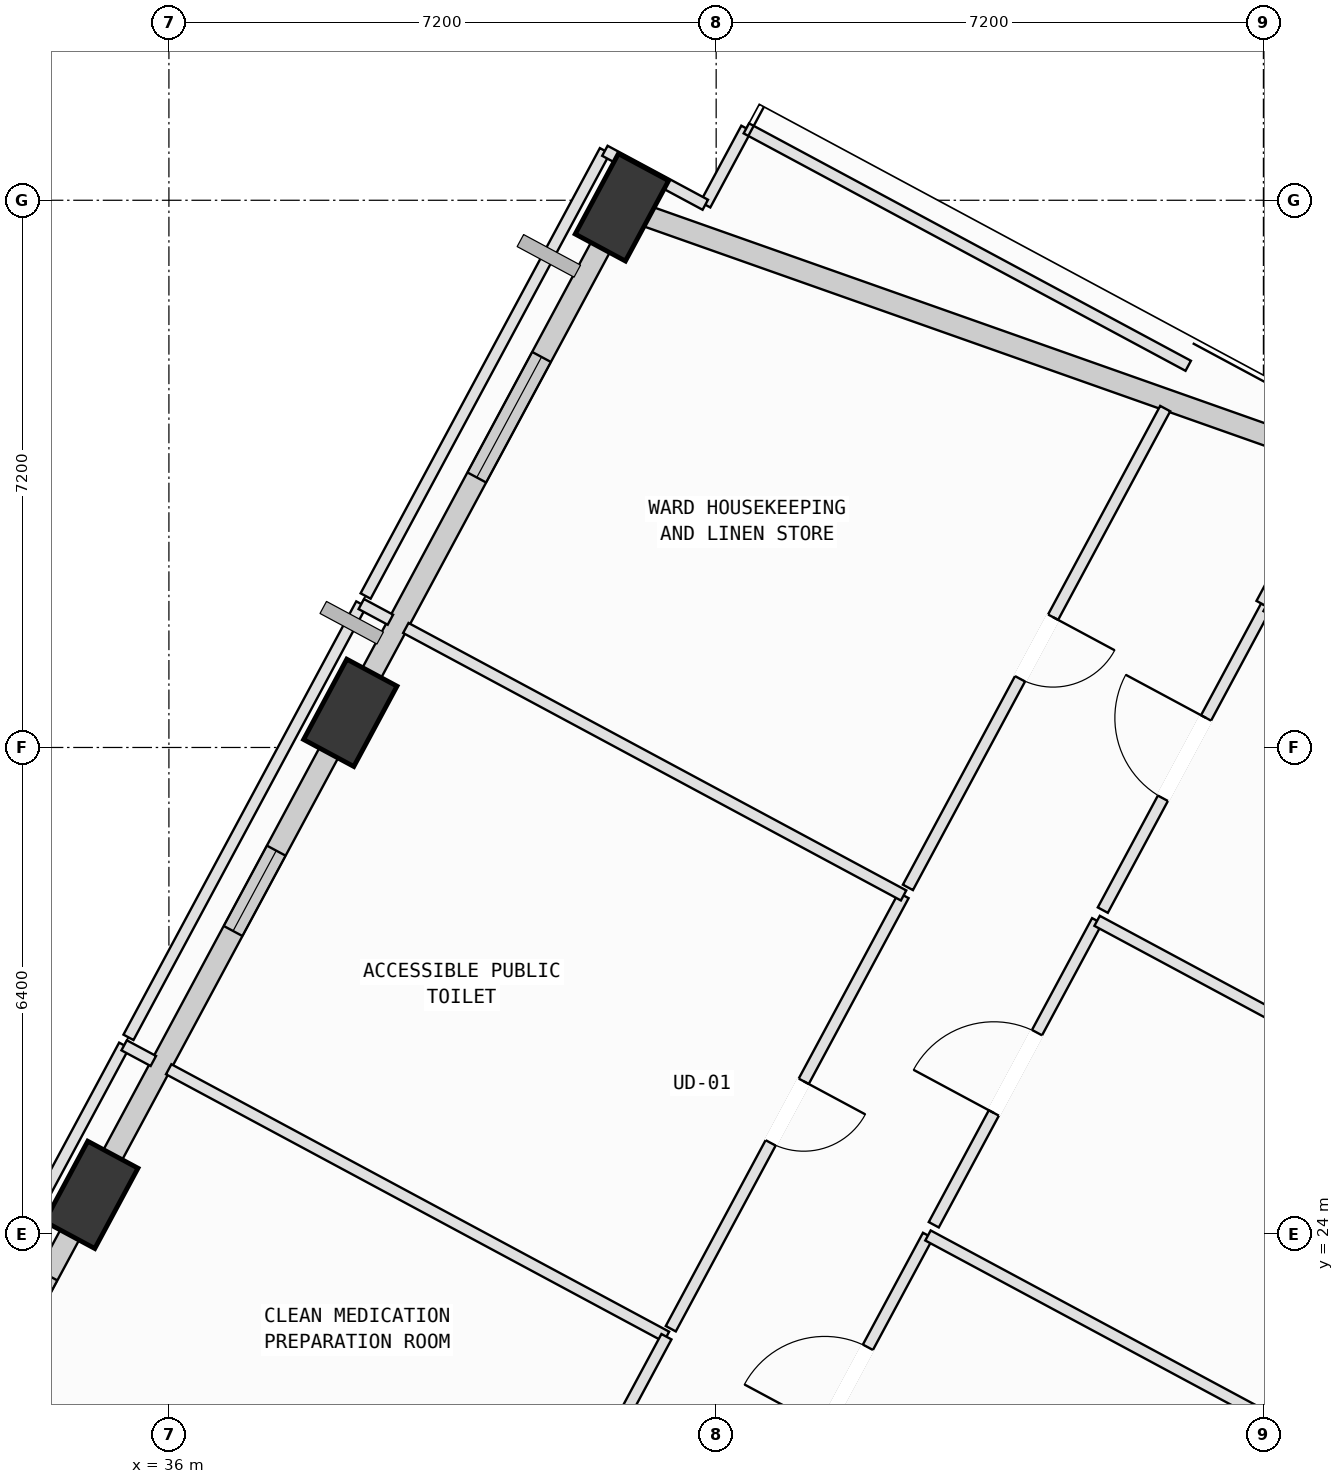
"""IFC4 building model, lengths in metres.
Left out: names, types, materials, properties, quantities, classifications, styles, units other than length and angle.
Written with IfcOpenShell. Run it as: python <this file> out.ifc"""

import sys

from ifc_helpers import new_model, si_unit, direction, frame, frame_2d, origin, origin_2d, place, context, subcontext, project, spatial, rectangle, extrude, element, fill, save


model = new_model("IFC4")
c1 = context("Model", 3, precision=1e-05, world=origin(), true_north=direction((0.0, 1.0)))
c2 = subcontext(c1, "Body", "Model", "MODEL_VIEW")
j1 = project(units=[si_unit("LENGTHUNIT", "METRE"), si_unit("PLANEANGLEUNIT", "RADIAN")], contexts=[c1])
p1 = place(None, origin())
s1 = spatial("IfcSite", under=j1, at=p1, CompositionType="ELEMENT")
p2 = place(p1, origin())
s2 = spatial("IfcBuilding", under=s1, at=p2, CompositionType="ELEMENT")
p3 = place(p2, frame((0.0, 0.0, 288.6)))
s3 = spatial("IfcBuildingStorey", under=s2, at=p3, CompositionType="ELEMENT", Elevation=288.6)
p4 = place(p3, frame((41.96, 37.507, 0.002), z_axis=(-0.052860994468, 0.034143202886, 0.998018014347), x_axis=(0.481683827276, -0.874590087934, 0.055433461268)))
e1 = element("IfcColumn", 1, at=p4, inside=s3, PredefinedType="COLUMN", context=c2, shape_type="SweptSolid", body=[
    extrude(rectangle(XDim=1.2, YDim=0.75, at=origin_2d()), origin(), (0.0, 0.0, 1.0), 4.004),
])
p5 = place(p3, frame((38.386, 30.856, 0.002), z_axis=(-0.02527873729, 0.019661240115, 0.999487078995), x_axis=(0.404386239678, -0.914153133905, 0.028210227402)))
e2 = element("IfcColumn", 2, at=p5, inside=s3, PredefinedType="COLUMN", context=c2, shape_type="SweptSolid", body=[
    extrude(rectangle(XDim=1.2, YDim=0.75, at=origin_2d()), origin(), (0.0, 0.0, 1.0), 3.998),
])
p6 = place(p3, frame((34.979, 24.513, 0.002), z_axis=(0.001160710729, 0.005742463608, 0.999982838284), x_axis=(-0.638457278881, -0.769639960871, 0.005160782248)))
e3 = element("IfcColumn", 3, at=p6, inside=s3, PredefinedType="COLUMN", context=c2, shape_type="SweptSolid", body=[
    extrude(rectangle(XDim=1.2, YDim=0.75, at=origin_2d()), origin(), (0.0, 0.0, 1.0), 3.996),
])
p7 = place(p3, frame((42.218, 37.415, 0.0), z_axis=(0.0, 0.0, 1.0), x_axis=(0.942871061755, -0.33315786184, 0.0)))
e4 = element("IfcWall", 4, at=p7, inside=s3, PredefinedType="SOLIDWALL", context=c2, shape_type="SweptSolid", body=[
    extrude(rectangle(XDim=9.036, YDim=0.28, at=frame_2d((4.518, 0.0))), origin(), (0.0, 0.0, 1.0), 3.265),
])
p8 = place(p3, frame((38.577, 31.211, 0.0), z_axis=(0.0, 0.0, 1.0), x_axis=(0.473322273544, 0.880889337753, 0.0)))
e5 = element("IfcWall", 5, at=p8, inside=s3, PredefinedType="SOLIDWALL", context=c2, shape_type="SweptSolid", body=[
    extrude(rectangle(XDim=6.78, YDim=0.28, at=frame_2d((3.39, 0.0))), origin(), (0.0, 0.0, 1.0), 3.265),
])
p9 = place(p8, frame((3.113, 0.0, 0.75)))
e6 = element("IfcOpeningElement", 6, at=p9, cuts=e5, PredefinedType="OPENING", context=c2, shape_type="SweptSolid", body=[
    extrude(rectangle(XDim=1.8, YDim=2.05, at=frame_2d((0.9, 1.025))), frame((0.0, 0.15, 0.0), z_axis=(0.0, -1.0, 0.0), x_axis=(1.0, 0.0, 0.0)), (0.0, 0.0, 1.0), 0.3),
])
p10 = place(p3, frame((35.172, 24.873, 0.0), z_axis=(0.0, 0.0, 1.0), x_axis=(0.473318247503, 0.880891501026, 0.0)))
e7 = element("IfcWall", 7, at=p10, inside=s3, PredefinedType="SOLIDWALL", context=c2, shape_type="SweptSolid", body=[
    extrude(rectangle(XDim=6.409, YDim=0.28, at=frame_2d((3.205, 0.0))), origin(), (0.0, 0.0, 1.0), 3.265),
])
p11 = place(p10, frame((3.533, 0.0, 0.75)))
e8 = element("IfcOpeningElement", 8, at=p11, cuts=e7, PredefinedType="OPENING", context=c2, shape_type="SweptSolid", body=[
    extrude(rectangle(XDim=1.2, YDim=1.75, at=frame_2d((0.6, 0.875))), frame((0.0, 0.15, 0.0), z_axis=(0.0, -1.0, 0.0), x_axis=(1.0, 0.0, 0.0)), (0.0, 0.0, 1.0), 0.3),
])
p12 = place(p3, frame((31.881, 18.748, 0.0), z_axis=(0.0, 0.0, 1.0), x_axis=(0.473312386533, 0.880894650202, 0.0)))
e9 = element("IfcWall", 9, at=p12, inside=s3, PredefinedType="SOLIDWALL", context=c2, shape_type="SweptSolid", body=[
    extrude(rectangle(XDim=6.158, YDim=0.28, at=frame_2d((3.079, 0.0))), origin(), (0.0, 0.0, 1.0), 3.265),
])
p13 = place(p12, frame((3.742, 0.0, 0.75)))
e10 = element("IfcOpeningElement", 10, at=p13, cuts=e9, PredefinedType="OPENING", context=c2, shape_type="SweptSolid", body=[
    extrude(rectangle(XDim=1.6, YDim=1.95, at=frame_2d((0.8, 0.975))), frame((0.0, 0.15, 0.0), z_axis=(0.0, -1.0, 0.0), x_axis=(1.0, 0.0, 0.0)), (0.0, 0.0, 1.0), 0.3),
])
p14 = place(p3, frame((43.838, 19.98, 0.0), z_axis=(0.0, 0.0, 1.0), x_axis=(0.473390959729, 0.880852427622, 0.0)))
e11 = element("IfcWall", 11, at=p14, inside=s3, PredefinedType="PARTITIONING", context=c2, shape_type="SweptSolid", body=[
    extrude(rectangle(XDim=4.54, YDim=0.15, at=frame_2d((2.27, 0.0))), origin(), (0.0, 0.0, 1.0), 3.78),
])
p15 = place(p14, frame((1.67, 0.0, 0.0)))
e12 = element("IfcOpeningElement", 12, at=p15, cuts=e11, PredefinedType="OPENING", context=c2, shape_type="SweptSolid", body=[
    extrude(rectangle(XDim=1.2, YDim=2.15, at=frame_2d((0.6, 1.075))), frame((0.0, 0.085, 0.0), z_axis=(0.0, -1.0, 0.0), x_axis=(1.0, 0.0, 0.0)), (0.0, 0.0, 1.0), 0.17),
])
p16 = place(p3, frame((45.987, 23.979, 0.0), z_axis=(0.0, 0.0, 1.0), x_axis=(0.880899093264, -0.473304117336, 0.0)))
e13 = element("IfcWall", 13, at=p16, inside=s3, PredefinedType="PARTITIONING", context=c2, shape_type="SweptSolid", body=[
    extrude(rectangle(XDim=10.834, YDim=0.15, at=frame_2d((5.417, 0.0))), origin(), (0.0, 0.0, 1.0), 3.78),
])
p17 = place(p3, frame((46.063, 24.12, 0.0), z_axis=(0.0, 0.0, 1.0), x_axis=(0.473371657247, 0.88086280096, 0.0)))
e14 = element("IfcWall", 14, at=p17, inside=s3, PredefinedType="PARTITIONING", context=c2, shape_type="SweptSolid", body=[
    extrude(rectangle(XDim=4.54, YDim=0.15, at=frame_2d((2.27, 0.0))), origin(), (0.0, 0.0, 1.0), 3.78),
])
p18 = place(p17, frame((1.67, 0.0, 0.0)))
e15 = element("IfcOpeningElement", 15, at=p18, cuts=e14, PredefinedType="OPENING", context=c2, shape_type="SweptSolid", body=[
    extrude(rectangle(XDim=1.2, YDim=2.15, at=frame_2d((0.6, 1.075))), frame((0.0, 0.085, 0.0), z_axis=(0.0, -1.0, 0.0), x_axis=(1.0, 0.0, 0.0)), (0.0, 0.0, 1.0), 0.17),
])
p19 = place(p3, frame((48.212, 28.119, 0.0), z_axis=(0.0, 0.0, 1.0), x_axis=(0.880904141107, -0.473294722324, 0.0)))
e16 = element("IfcWall", 16, at=p19, inside=s3, PredefinedType="PARTITIONING", context=c2, shape_type="SweptSolid", body=[
    extrude(rectangle(XDim=10.834, YDim=0.15, at=frame_2d((5.417, 0.0))), origin(), (0.0, 0.0, 1.0), 3.78),
])
p20 = place(p3, frame((48.287, 28.26, 0.0), z_axis=(0.0, 0.0, 1.0), x_axis=(0.473259555236, 0.880923034877, 0.0)))
e17 = element("IfcWall", 17, at=p20, inside=s3, PredefinedType="PARTITIONING", context=c2, shape_type="SweptSolid", body=[
    extrude(rectangle(XDim=4.541, YDim=0.15, at=frame_2d((2.271, 0.0))), origin(), (0.0, 0.0, 1.0), 3.78),
])
p21 = place(p20, frame((1.67, 0.0, 0.0)))
e18 = element("IfcOpeningElement", 18, at=p21, cuts=e17, PredefinedType="OPENING", context=c2, shape_type="SweptSolid", body=[
    extrude(rectangle(XDim=1.2, YDim=2.15, at=frame_2d((0.6, 1.075))), frame((0.0, 0.085, 0.0), z_axis=(0.0, -1.0, 0.0), x_axis=(1.0, 0.0, 0.0)), (0.0, 0.0, 1.0), 0.17),
])
p22 = place(p3, frame((50.436, 32.26, 0.0), z_axis=(0.0, 0.0, 1.0), x_axis=(0.880864883218, -0.473367782505, 0.0)))
e19 = element("IfcWall", 19, at=p22, inside=s3, PredefinedType="PARTITIONING", context=c2, shape_type="SweptSolid", body=[
    extrude(rectangle(XDim=8.832, YDim=0.15, at=frame_2d((4.416, 0.0))), origin(), (0.0, 0.0, 1.0), 3.78),
])
p23 = place(p22, frame((3.986, 0.0, 0.0)))
e20 = element("IfcOpeningElement", 20, at=p23, cuts=e19, PredefinedType="OPENING", context=c2, shape_type="SweptSolid", body=[
    extrude(rectangle(XDim=0.86, YDim=2.06, at=frame_2d((0.43, 1.03))), frame((0.0, 0.085, 0.0), z_axis=(0.0, -1.0, 0.0), x_axis=(1.0, 0.0, 0.0)), (0.0, 0.0, 1.0), 0.17),
])
p24 = place(p3, frame((32.504, 21.07, 0.0), z_axis=(0.0, 0.0, 1.0), x_axis=(0.473270026335, 0.880917409394, 0.0)))
e21 = element("IfcWall", 21, at=p24, inside=s3, PredefinedType="PARTITIONING", context=c2, shape_type="SweptSolid", body=[
    extrude(rectangle(XDim=6.142, YDim=0.15, at=frame_2d((3.071, 0.0))), origin(), (0.0, 0.0, 1.0), 3.78),
])
p25 = place(p3, frame((35.411, 26.481, 0.0), z_axis=(0.0, 0.0, 1.0), x_axis=(0.881171652639, -0.472796487493, 0.0)))
e22 = element("IfcWall", 22, at=p25, inside=s3, PredefinedType="PARTITIONING", context=c2, shape_type="SweptSolid", body=[
    extrude(rectangle(XDim=0.436, YDim=0.15, at=frame_2d((0.218, 0.0))), origin(), (0.0, 0.0, 1.0), 3.78),
])
p26 = place(p3, frame((35.997, 26.166, 0.0), z_axis=(0.0, 0.0, 1.0), x_axis=(0.88087780034, -0.473343744934, 0.0)))
e23 = element("IfcWall", 23, at=p26, inside=s3, PredefinedType="PARTITIONING", context=c2, shape_type="SweptSolid", body=[
    extrude(rectangle(XDim=7.434, YDim=0.15, at=frame_2d((3.717, 0.0))), origin(), (0.0, 0.0, 1.0), 3.78),
])
p27 = place(p3, frame((42.546, 22.647, 0.0), z_axis=(0.0, 0.0, 1.0), x_axis=(-0.473270026335, -0.880917409394, 0.0)))
e24 = element("IfcWall", 24, at=p27, inside=s3, PredefinedType="PARTITIONING", context=c2, shape_type="SweptSolid", body=[
    extrude(rectangle(XDim=6.142, YDim=0.15, at=frame_2d((3.071, 0.0))), origin(), (0.0, 0.0, 1.0), 3.78),
])
p28 = place(p3, frame((45.666, 28.453, 0.0), z_axis=(0.0, 0.0, 1.0), x_axis=(-0.473292007071, -0.880905599961, 0.0)))
e25 = element("IfcWall", 25, at=p28, inside=s3, PredefinedType="PARTITIONING", context=c2, shape_type="SweptSolid", body=[
    extrude(rectangle(XDim=6.472, YDim=0.15, at=frame_2d((3.236, 0.0))), origin(), (0.0, 0.0, 1.0), 3.78),
])
p29 = place(p28, frame((2.776, 0.0, 0.0)))
e26 = element("IfcOpeningElement", 26, at=p29, cuts=e25, PredefinedType="OPENING", context=c2, shape_type="SweptSolid", body=[
    extrude(rectangle(XDim=0.92, YDim=2.1, at=frame_2d((0.46, 1.05))), frame((0.0, 0.085, 0.0), z_axis=(0.0, -1.0, 0.0), x_axis=(1.0, 0.0, 0.0)), (0.0, 0.0, 1.0), 0.17),
])
p30 = place(p3, frame((35.468, 26.586, 0.0), z_axis=(0.0, 0.0, 1.0), x_axis=(0.473276279195, 0.880914050036, 0.0)))
e27 = element("IfcWall", 27, at=p30, inside=s3, PredefinedType="PARTITIONING", context=c2, shape_type="SweptSolid", body=[
    extrude(rectangle(XDim=6.472, YDim=0.15, at=frame_2d((3.236, 0.0))), origin(), (0.0, 0.0, 1.0), 3.265),
])
p31 = place(p3, frame((38.531, 32.287, 0.0), z_axis=(0.0, 0.0, 1.0), x_axis=(0.880669277933, -0.473731593738, 0.0)))
e28 = element("IfcWall", 28, at=p31, inside=s3, PredefinedType="PARTITIONING", context=c2, shape_type="SweptSolid", body=[
    extrude(rectangle(XDim=0.435, YDim=0.15, at=frame_2d((0.218, 0.0))), origin(), (0.0, 0.0, 1.0), 3.78),
])
p32 = place(p3, frame((39.117, 31.972, 0.0), z_axis=(0.0, 0.0, 1.0), x_axis=(0.880885157777, -0.47333005272, 0.0)))
e29 = element("IfcWall", 29, at=p32, inside=s3, PredefinedType="PARTITIONING", context=c2, shape_type="SweptSolid", body=[
    extrude(rectangle(XDim=7.435, YDim=0.15, at=frame_2d((3.717, 0.0))), origin(), (0.0, 0.0, 1.0), 3.78),
])
p33 = place(p3, frame((43.057, 37.541, 0.0), z_axis=(0.0, 0.0, 1.0), x_axis=(0.473384998992, 0.880855631037, 0.0)))
e30 = element("IfcWall", 30, at=p33, inside=s3, PredefinedType="PARTITIONING", context=c2, shape_type="SweptSolid", body=[
    extrude(rectangle(XDim=1.141, YDim=0.15, at=frame_2d((0.57, 0.0))), origin(), (0.0, 0.0, 1.0), 3.78),
])
p34 = place(p3, frame((43.597, 38.546, 0.0), z_axis=(0.0, 0.0, 1.0), x_axis=(0.880901900683, -0.473298892216, 0.0)))
e31 = element("IfcWall", 31, at=p34, inside=s3, PredefinedType="PARTITIONING", context=c2, shape_type="SweptSolid", body=[
    extrude(rectangle(XDim=6.6, YDim=0.15, at=frame_2d((3.3, 0.0))), origin(), (0.0, 0.0, 1.0), 3.265),
])
p35 = place(p3, frame((49.108, 34.859, 0.0), z_axis=(0.0, 0.0, 1.0), x_axis=(-0.473319949653, -0.88089058643, 0.0)))
e32 = element("IfcWall", 32, at=p35, inside=s3, PredefinedType="PARTITIONING", context=c2, shape_type="SweptSolid", body=[
    extrude(rectangle(XDim=7.152, YDim=0.15, at=frame_2d((3.576, 0.0))), origin(), (0.0, 0.0, 1.0), 3.78),
])
p36 = place(p35, frame((3.116, 0.0, 0.0)))
e33 = element("IfcOpeningElement", 33, at=p36, cuts=e32, PredefinedType="OPENING", context=c2, shape_type="SweptSolid", body=[
    extrude(rectangle(XDim=0.92, YDim=2.1, at=frame_2d((0.46, 1.05))), frame((0.0, 0.085, 0.0), z_axis=(0.0, -1.0, 0.0), x_axis=(1.0, 0.0, 0.0)), (0.0, 0.0, 1.0), 0.17),
])
p37 = place(p3, frame((38.588, 32.393, 0.0), z_axis=(0.0, 0.0, 1.0), x_axis=(0.473392556104, 0.88085156969, 0.0)))
e34 = element("IfcWall", 34, at=p37, inside=s3, PredefinedType="PARTITIONING", context=c2, shape_type="SweptSolid", body=[
    extrude(rectangle(XDim=6.65, YDim=0.15, at=frame_2d((3.325, 0.0))), origin(), (0.0, 0.0, 1.0), 3.265),
])
p38 = place(p3, frame((41.736, 38.251, 0.0), z_axis=(0.0, 0.0, 1.0), x_axis=(0.880815909858, -0.473458903118, 0.0)))
e35 = element("IfcWall", 35, at=p38, inside=s3, PredefinedType="PARTITIONING", context=c2, shape_type="SweptSolid", body=[
    extrude(rectangle(XDim=1.5, YDim=0.15, at=frame_2d((0.75, 0.0))), origin(), (0.0, 0.0, 1.0), 3.265),
])
p39 = place(p3, frame((50.375, 32.293, 0.0), z_axis=(0.0, 0.0, 1.0), x_axis=(0.47339968985, 0.880847735792, 0.0)))
e36 = element("IfcWall", 36, at=p39, inside=s3, PredefinedType="PARTITIONING", context=c2, shape_type="SweptSolid", body=[
    extrude(rectangle(XDim=2.018, YDim=0.15, at=frame_2d((1.009, 0.0))), origin(), (0.0, 0.0, 1.0), 3.78),
])
p40 = place(p9, origin())
e37 = element("IfcWindow", 37, at=p40, inside=s3, PartitioningType="SINGLE_PANEL", PredefinedType="WINDOW", context=c2, shape_type="SweptSolid", body=[
    extrude(rectangle(XDim=1.8, YDim=2.05, at=frame_2d((0.9, 1.025))), frame((0.0, 0.03, 0.0), z_axis=(0.0, -1.0, 0.0), x_axis=(1.0, 0.0, 0.0)), (0.0, 0.0, 1.0), 0.06),
])
fill(e6, e37)
p41 = place(p11, origin())
e38 = element("IfcWindow", 38, at=p41, inside=s3, PartitioningType="SINGLE_PANEL", PredefinedType="WINDOW", context=c2, shape_type="SweptSolid", body=[
    extrude(rectangle(XDim=1.2, YDim=1.75, at=frame_2d((0.6, 0.875))), frame((0.0, 0.03, 0.0), z_axis=(0.0, -1.0, 0.0), x_axis=(1.0, 0.0, 0.0)), (0.0, 0.0, 1.0), 0.06),
])
fill(e8, e38)
p42 = place(p15, origin())
e39 = element("IfcDoor", 39, at=p42, inside=s3, OperationType="SINGLE_SWING_LEFT", PredefinedType="DOOR", context=c2, shape_type="SweptSolid", body=[
    extrude(rectangle(XDim=1.2, YDim=2.15, at=frame_2d((0.6, 1.075))), frame((0.0, 0.025, 0.0), z_axis=(0.0, -1.0, 0.0), x_axis=(1.0, 0.0, 0.0)), (0.0, 0.0, 1.0), 0.05),
])
fill(e12, e39)
p43 = place(p18, origin())
e40 = element("IfcDoor", 40, at=p43, inside=s3, OperationType="SINGLE_SWING_LEFT", PredefinedType="DOOR", context=c2, shape_type="SweptSolid", body=[
    extrude(rectangle(XDim=1.2, YDim=2.15, at=frame_2d((0.6, 1.075))), frame((0.0, 0.025, 0.0), z_axis=(0.0, -1.0, 0.0), x_axis=(1.0, 0.0, 0.0)), (0.0, 0.0, 1.0), 0.05),
])
fill(e15, e40)
p44 = place(p21, origin())
e41 = element("IfcDoor", 41, at=p44, inside=s3, OperationType="SINGLE_SWING_RIGHT", PredefinedType="DOOR", context=c2, shape_type="SweptSolid", body=[
    extrude(rectangle(XDim=1.2, YDim=2.15, at=frame_2d((0.6, 1.075))), frame((0.0, 0.025, 0.0), z_axis=(0.0, -1.0, 0.0), x_axis=(1.0, 0.0, 0.0)), (0.0, 0.0, 1.0), 0.05),
])
fill(e18, e41)
p45 = place(p29, origin())
e42 = element("IfcDoor", 42, at=p45, inside=s3, OperationType="SINGLE_SWING_LEFT", PredefinedType="DOOR", context=c2, shape_type="SweptSolid", body=[
    extrude(rectangle(XDim=0.92, YDim=2.1, at=frame_2d((0.46, 1.05))), frame((0.0, 0.025, 0.0), z_axis=(0.0, -1.0, 0.0), x_axis=(1.0, 0.0, 0.0)), (0.0, 0.0, 1.0), 0.05),
])
fill(e26, e42)
p46 = place(p36, origin())
e43 = element("IfcDoor", 43, at=p46, inside=s3, OperationType="SINGLE_SWING_LEFT", PredefinedType="DOOR", context=c2, shape_type="SweptSolid", body=[
    extrude(rectangle(XDim=0.92, YDim=2.1, at=frame_2d((0.46, 1.05))), frame((0.0, 0.025, 0.0), z_axis=(0.0, -1.0, 0.0), x_axis=(1.0, 0.0, 0.0)), (0.0, 0.0, 1.0), 0.05),
])
fill(e33, e43)
save(model, sys.argv[1])
